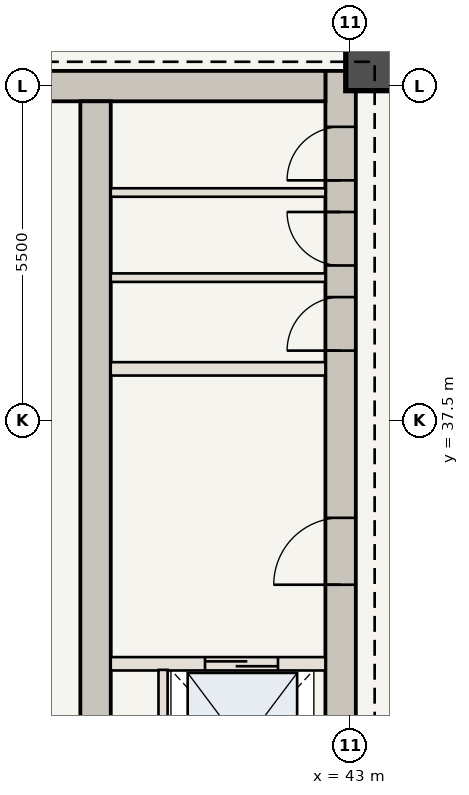
"""IFC4 building model, lengths in metres.
Left out: names, types, materials, properties, quantities, classifications, styles, units other than length and angle.
Written with IfcOpenShell. Run it as: python <this file> out.ifc"""

import sys

from ifc_helpers import new_model, si_unit, direction, frame, frame_2d, origin, origin_2d, place, context, subcontext, project, spatial, rectangle, extrude, element, fill, save


model = new_model("IFC4")
c1 = context("Model", 3, precision=1e-05, world=origin(), true_north=direction((0.0, 1.0)))
c2 = subcontext(c1, "Body", "Model", "MODEL_VIEW")
j1 = project(units=[si_unit("LENGTHUNIT", "METRE"), si_unit("PLANEANGLEUNIT", "RADIAN")], contexts=[c1])
p1 = place(None, origin())
s1 = spatial("IfcSite", under=j1, at=p1, CompositionType="ELEMENT")
p2 = place(p1, origin())
s2 = spatial("IfcBuilding", under=s1, at=p2, CompositionType="ELEMENT")
p3 = place(p2, frame((0.0, 0.0, 206.15)))
s3 = spatial("IfcBuildingStorey", under=s2, at=p3, CompositionType="ELEMENT", Elevation=206.15)
p4 = place(p3, frame((42.84, 30.6, 0.0), z_axis=(0.0, 0.0, 1.0), x_axis=(0.0, 1.0, 0.0)))
e1 = element("IfcWall", 1, at=p4, inside=s3, PredefinedType="SHEAR", context=c2, shape_type="SweptSolid", body=[
    extrude(rectangle(XDim=12.65, YDim=0.5, at=frame_2d((6.325, 0.0))), origin(), (0.0, 0.0, 1.0), 3.85),
])
p5 = place(p4, frame((4.2, 0.0, 0.0)))
e2 = element("IfcOpeningElement", 2, at=p5, cuts=e1, PredefinedType="OPENING", context=c2, shape_type="SweptSolid", body=[
    extrude(rectangle(XDim=1.1, YDim=2.15, at=frame_2d((0.55, 1.075))), frame((0.0, 0.26, 0.0), z_axis=(0.0, -1.0, 0.0), x_axis=(1.0, 0.0, 0.0)), (0.0, 0.0, 1.0), 0.52),
])
p6 = place(p4, frame((8.05, 0.0, 0.0)))
e3 = element("IfcOpeningElement", 3, at=p6, cuts=e1, PredefinedType="OPENING", context=c2, shape_type="SweptSolid", body=[
    extrude(rectangle(XDim=0.88, YDim=2.1, at=frame_2d((0.44, 1.05))), frame((0.0, 0.26, 0.0), z_axis=(0.0, -1.0, 0.0), x_axis=(1.0, 0.0, 0.0)), (0.0, 0.0, 1.0), 0.52),
])
p7 = place(p4, frame((9.45, 0.0, 0.0)))
e4 = element("IfcOpeningElement", 4, at=p7, cuts=e1, PredefinedType="OPENING", context=c2, shape_type="SweptSolid", body=[
    extrude(rectangle(XDim=0.88, YDim=2.1, at=frame_2d((0.44, 1.05))), frame((0.0, 0.26, 0.0), z_axis=(0.0, -1.0, 0.0), x_axis=(1.0, 0.0, 0.0)), (0.0, 0.0, 1.0), 0.52),
])
p8 = place(p4, frame((10.85, 0.0, 0.0)))
e5 = element("IfcOpeningElement", 5, at=p8, cuts=e1, PredefinedType="OPENING", context=c2, shape_type="SweptSolid", body=[
    extrude(rectangle(XDim=0.88, YDim=2.1, at=frame_2d((0.44, 1.05))), frame((0.0, 0.26, 0.0), z_axis=(0.0, -1.0, 0.0), x_axis=(1.0, 0.0, 0.0)), (0.0, 0.0, 1.0), 0.52),
])
p9 = place(p3, frame((37.75, 43.0, 0.0), z_axis=(0.0, 0.0, 1.0), x_axis=(1.0, 0.0, 0.0)))
e6 = element("IfcWall", 6, at=p9, inside=s3, PredefinedType="SHEAR", context=c2, shape_type="SweptSolid", body=[
    extrude(rectangle(XDim=4.84, YDim=0.5, at=frame_2d((2.42, 0.0))), origin(), (0.0, 0.0, 1.0), 3.85),
])
p10 = place(p3, frame((38.81, 30.6, 0.0), z_axis=(0.0, 0.0, 1.0), x_axis=(0.0, 1.0, 0.0)))
e7 = element("IfcWall", 7, at=p10, inside=s3, PredefinedType="SHEAR", context=c2, shape_type="SweptSolid", body=[
    extrude(rectangle(XDim=12.15, YDim=0.5, at=frame_2d((6.075, 0.0))), origin(), (0.0, 0.0, 1.0), 3.85),
])
p11 = place(p3, frame((43.35, 43.35, 0.0), z_axis=(0.0, 0.0, 1.0), x_axis=(1.0, 0.0, 0.0)))
e8 = element("IfcColumn", 8, at=p11, inside=s3, PredefinedType="COLUMN", context=c2, shape_type="SweptSolid", body=[
    extrude(rectangle(XDim=0.85, YDim=0.85, at=origin_2d()), origin(), (0.0, 0.0, 1.0), 3.85),
])
p12 = place(p3, frame((39.06, 33.5, 0.0), z_axis=(0.0, 0.0, 1.0), x_axis=(1.0, 0.0, 0.0)))
e9 = element("IfcWall", 9, at=p12, inside=s3, PredefinedType="STANDARD", context=c2, shape_type="SweptSolid", body=[
    extrude(rectangle(XDim=3.53, YDim=0.22, at=frame_2d((1.765, 0.0))), origin(), (0.0, 0.0, 1.0), 3.685),
])
p13 = place(p12, frame((1.55, 0.0, 0.0)))
e10 = element("IfcOpeningElement", 10, at=p13, cuts=e9, PredefinedType="OPENING", context=c2, shape_type="SweptSolid", body=[
    extrude(rectangle(XDim=1.2, YDim=2.2, at=frame_2d((0.6, 1.1))), frame((0.0, 0.12, 0.0), z_axis=(0.0, -1.0, 0.0), x_axis=(1.0, 0.0, 0.0)), (0.0, 0.0, 1.0), 0.24),
])
p14 = place(p3, frame((39.92, 30.75, 0.0), z_axis=(0.0, 0.0, 1.0), x_axis=(0.0, 1.0, 0.0)))
e11 = element("IfcWall", 11, at=p14, inside=s3, PredefinedType="STANDARD", context=c2, shape_type="SweptSolid", body=[
    extrude(rectangle(XDim=2.65, YDim=0.15, at=frame_2d((1.325, 0.0))), origin(), (0.0, 0.0, 1.0), 3.685),
])
p15 = place(p3, frame((39.06, 38.35, 0.0), z_axis=(0.0, 0.0, 1.0), x_axis=(1.0, 0.0, 0.0)))
e12 = element("IfcWall", 12, at=p15, inside=s3, PredefinedType="STANDARD", context=c2, shape_type="SweptSolid", body=[
    extrude(rectangle(XDim=3.53, YDim=0.22, at=frame_2d((1.765, 0.0))), origin(), (0.0, 0.0, 1.0), 3.685),
])
for number, where, z_axis, x_axis in (
    (13, (39.06, 39.85, 0.0), (0.0, 0.0, 1.0), (1.0, 0.0, 0.0)),
    (14, (39.06, 41.25, 0.0), (0.0, 0.0, 1.0), (1.0, 0.0, 0.0)),
):
    element("IfcWall", number, at=place(p3, frame(where, z_axis=z_axis, x_axis=x_axis)), inside=s3, PredefinedType="STANDARD", context=c2, shape_type="SweptSolid", body=[
        extrude(rectangle(XDim=3.53, YDim=0.14, at=frame_2d((1.765, 0.0))), origin(), (0.0, 0.0, 1.0), 3.685),
    ])
p16 = place(p5, origin())
e15 = element("IfcDoor", 15, at=p16, inside=s3, OperationType="SINGLE_SWING_LEFT", PredefinedType="DOOR", context=c2, shape_type="SweptSolid", body=[
    extrude(rectangle(XDim=1.1, YDim=2.15, at=frame_2d((0.55, 1.075))), frame((0.0, 0.025, 0.0), z_axis=(0.0, -1.0, 0.0), x_axis=(1.0, 0.0, 0.0)), (0.0, 0.0, 1.0), 0.05),
])
fill(e2, e15)
p17 = place(p6, origin())
e16 = element("IfcDoor", 16, at=p17, inside=s3, OperationType="SINGLE_SWING_LEFT", PredefinedType="DOOR", context=c2, shape_type="SweptSolid", body=[
    extrude(rectangle(XDim=0.88, YDim=2.1, at=frame_2d((0.44, 1.05))), frame((0.0, 0.025, 0.0), z_axis=(0.0, -1.0, 0.0), x_axis=(1.0, 0.0, 0.0)), (0.0, 0.0, 1.0), 0.05),
])
fill(e3, e16)
p18 = place(p7, origin())
e17 = element("IfcDoor", 17, at=p18, inside=s3, OperationType="SINGLE_SWING_RIGHT", PredefinedType="DOOR", context=c2, shape_type="SweptSolid", body=[
    extrude(rectangle(XDim=0.88, YDim=2.1, at=frame_2d((0.44, 1.05))), frame((0.0, 0.025, 0.0), z_axis=(0.0, -1.0, 0.0), x_axis=(1.0, 0.0, 0.0)), (0.0, 0.0, 1.0), 0.05),
])
fill(e4, e17)
p19 = place(p8, origin())
e18 = element("IfcDoor", 18, at=p19, inside=s3, OperationType="SINGLE_SWING_LEFT", PredefinedType="DOOR", context=c2, shape_type="SweptSolid", body=[
    extrude(rectangle(XDim=0.88, YDim=2.1, at=frame_2d((0.44, 1.05))), frame((0.0, 0.025, 0.0), z_axis=(0.0, -1.0, 0.0), x_axis=(1.0, 0.0, 0.0)), (0.0, 0.0, 1.0), 0.05),
])
fill(e5, e18)
p20 = place(p13, origin())
e19 = element("IfcDoor", 19, at=p20, inside=s3, OperationType="DOUBLE_DOOR_SLIDING", PredefinedType="DOOR", context=c2, shape_type="SweptSolid", body=[
    extrude(rectangle(XDim=1.2, YDim=2.2, at=frame_2d((0.6, 1.1))), frame((0.0, 0.025, 0.0), z_axis=(0.0, -1.0, 0.0), x_axis=(1.0, 0.0, 0.0)), (0.0, 0.0, 1.0), 0.05),
])
fill(e10, e19)
save(model, sys.argv[1])
